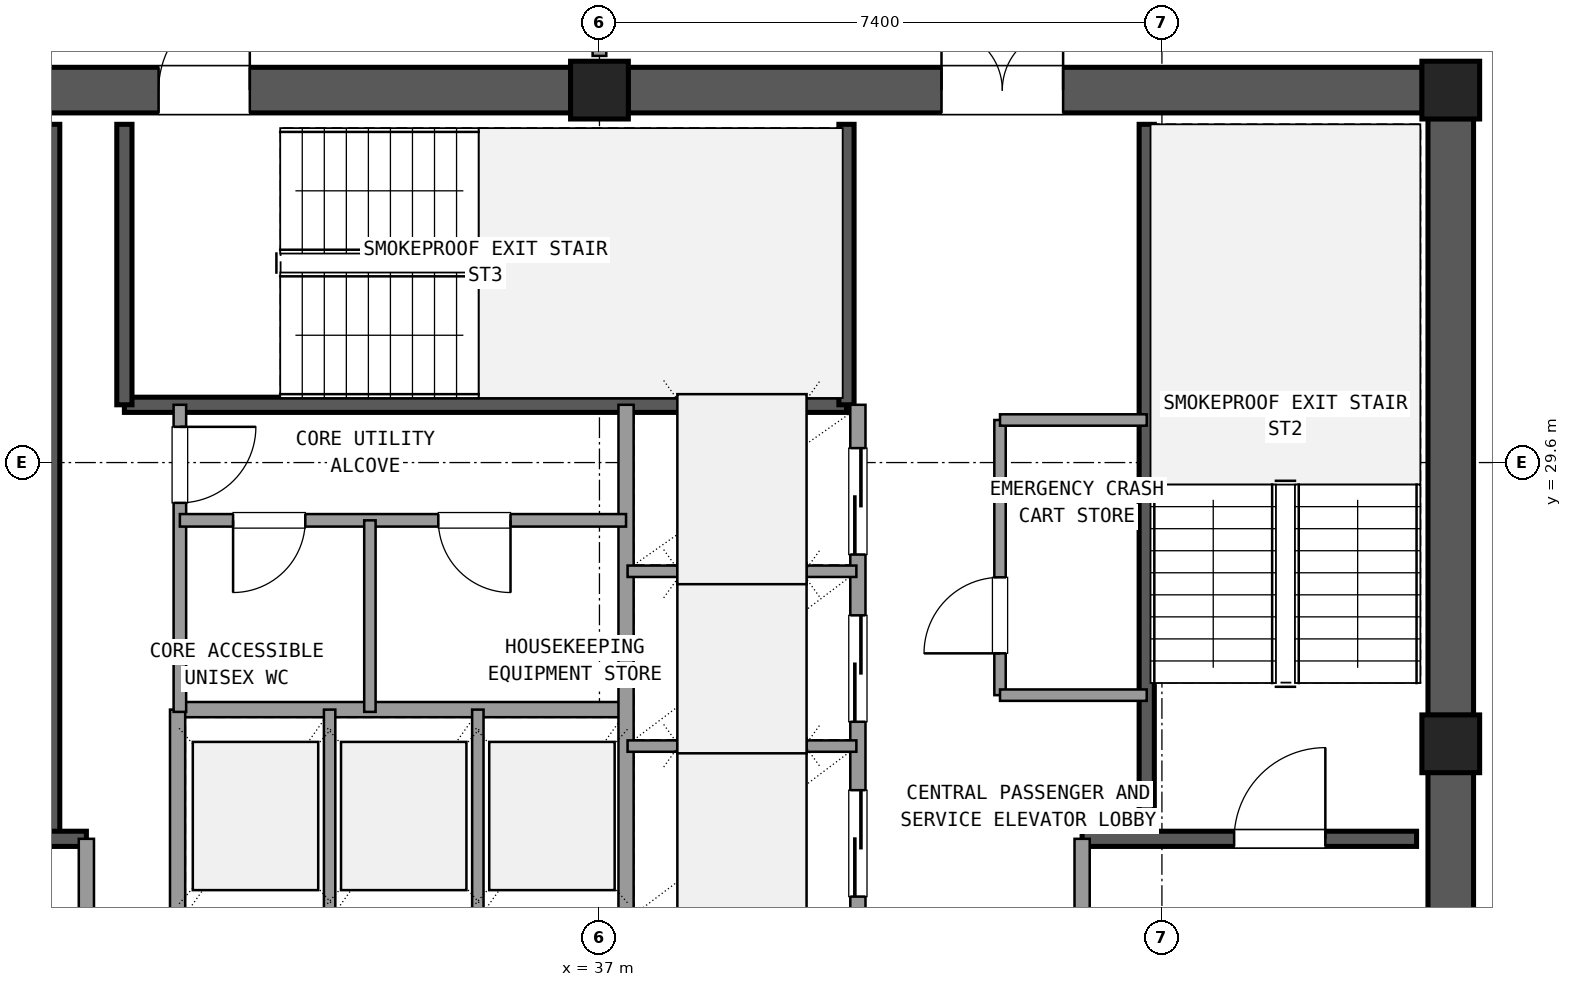
"""IFC4 building model, lengths in metres.
Left out: names, types, materials, properties, quantities, classifications, styles, units other than length and angle.
Written with IfcOpenShell. Run it as: python <this file> out.ifc"""

import sys

from ifc_helpers import new_model, si_unit, direction, frame, frame_2d, origin, origin_2d, place, context, subcontext, project, spatial, rectangle, extrude, element, fill, save


model = new_model("IFC4")
c1 = context("Model", 3, precision=1e-05, world=origin(), true_north=direction((0.0, 1.0)))
c2 = subcontext(c1, "Body", "Model", "MODEL_VIEW")
j1 = project(units=[si_unit("LENGTHUNIT", "METRE"), si_unit("PLANEANGLEUNIT", "RADIAN")], contexts=[c1])
p1 = place(None, origin())
s1 = spatial("IfcSite", under=j1, at=p1, CompositionType="ELEMENT")
p2 = place(p1, origin())
s2 = spatial("IfcBuilding", under=s1, at=p2, CompositionType="ELEMENT")
p3 = place(p2, frame((0.0, 0.0, 257.22)))
s3 = spatial("IfcBuildingStorey", under=s2, at=p3, CompositionType="ELEMENT", Elevation=257.22)
for number, where, z_axis, x_axis in (
    (1, (48.2, 25.9, 0.0), (0.0, 0.0, 1.0), (1.0, 0.0, 0.0)),
    (2, (48.2, 34.5, 0.0), (0.0, 0.0, 1.0), (1.0, 0.0, 0.0)),
    (3, (37.0, 34.5, 0.0), (0.0, 0.0, 1.0), (1.0, 0.0, 0.0)),
):
    element("IfcColumn", number, at=place(p3, frame(where, z_axis=z_axis, x_axis=x_axis)), inside=s3, PredefinedType="COLUMN", context=c2, shape_type="SweptSolid", body=[
        extrude(rectangle(XDim=0.76, YDim=0.76, at=origin_2d()), origin(), (0.0, 0.0, 1.0), 3.6),
    ])
p4 = place(p3, frame((48.2, 17.675, 0.0), z_axis=(0.0, 0.0, 1.0), x_axis=(0.0, 1.0, 0.0)))
e4 = element("IfcWall", 4, at=p4, inside=s3, PredefinedType="SHEAR", context=c2, shape_type="SweptSolid", body=[
    extrude(rectangle(XDim=7.85, YDim=0.6, at=frame_2d((3.925, 0.0))), origin(), (0.0, 0.0, 1.0), 3.32),
])
p5 = place(p4, frame((4.375, 0.0, 0.0)))
e5 = element("IfcOpeningElement", 5, at=p5, cuts=e4, PredefinedType="OPENING", context=c2, shape_type="SweptSolid", body=[
    extrude(rectangle(XDim=1.2, YDim=2.15, at=frame_2d((0.6, 1.075))), frame((0.0, 0.31, 0.0), z_axis=(0.0, -1.0, 0.0), x_axis=(1.0, 0.0, 0.0)), (0.0, 0.0, 1.0), 0.62),
])
p6 = place(p3, frame((48.2, 26.275, 0.0), z_axis=(0.0, 0.0, 1.0), x_axis=(0.0, 1.0, 0.0)))
e6 = element("IfcWall", 6, at=p6, inside=s3, PredefinedType="SHEAR", context=c2, shape_type="SweptSolid", body=[
    extrude(rectangle(XDim=7.85, YDim=0.6, at=frame_2d((3.925, 0.0))), origin(), (0.0, 0.0, 1.0), 3.32),
])
p7 = place(p3, frame((47.825, 34.5, 0.0), z_axis=(0.0, 0.0, 1.0), x_axis=(-1.0, 0.0, 0.0)))
e7 = element("IfcWall", 7, at=p7, inside=s3, PredefinedType="SHEAR", context=c2, shape_type="SweptSolid", body=[
    extrude(rectangle(XDim=10.45, YDim=0.6, at=frame_2d((5.225, 0.0))), origin(), (0.0, 0.0, 1.0), 3.32),
])
p8 = place(p7, frame((4.725, 0.0, 0.0)))
e8 = element("IfcOpeningElement", 8, at=p8, cuts=e7, PredefinedType="OPENING", context=c2, shape_type="SweptSolid", body=[
    extrude(rectangle(XDim=1.6, YDim=2.2, at=frame_2d((0.8, 1.1))), frame((0.0, 0.31, 0.0), z_axis=(0.0, -1.0, 0.0), x_axis=(1.0, 0.0, 0.0)), (0.0, 0.0, 1.0), 0.62),
])
p9 = place(p3, frame((36.625, 34.5, 0.0), z_axis=(0.0, 0.0, 1.0), x_axis=(-1.0, 0.0, 0.0)))
e9 = element("IfcWall", 9, at=p9, inside=s3, PredefinedType="SHEAR", context=c2, shape_type="SweptSolid", body=[
    extrude(rectangle(XDim=10.45, YDim=0.6, at=frame_2d((5.225, 0.0))), origin(), (0.0, 0.0, 1.0), 3.32),
])
p10 = place(p9, frame((4.225, 0.0, 0.0)))
e10 = element("IfcOpeningElement", 10, at=p10, cuts=e9, PredefinedType="OPENING", context=c2, shape_type="SweptSolid", body=[
    extrude(rectangle(XDim=1.2, YDim=2.15, at=frame_2d((0.6, 1.075))), frame((0.0, 0.31, 0.0), z_axis=(0.0, -1.0, 0.0), x_axis=(1.0, 0.0, 0.0)), (0.0, 0.0, 1.0), 0.62),
])
p11 = place(p3, frame((29.8, 24.65, 0.0), z_axis=(0.0, 0.0, 1.0), x_axis=(0.0, 1.0, 0.0)))
e11 = element("IfcWall", 11, at=p11, inside=s3, PredefinedType="SHEAR", context=c2, shape_type="SweptSolid", body=[
    extrude(rectangle(XDim=9.4, YDim=0.2, at=frame_2d((4.7, 0.0))), origin(), (0.0, 0.0, 1.0), 3.32),
])
p12 = place(p3, frame((26.25, 24.65, 0.0), z_axis=(0.0, 0.0, 1.0), x_axis=(1.0, 0.0, 0.0)))
e12 = element("IfcWall", 12, at=p12, inside=s3, PredefinedType="SHEAR", context=c2, shape_type="SweptSolid", body=[
    extrude(rectangle(XDim=4.0, YDim=0.2, at=frame_2d((2.0, 0.0))), origin(), (0.0, 0.0, 1.0), 3.32),
])
p13 = place(p12, frame((1.0, 0.0, 0.0)))
e13 = element("IfcOpeningElement", 13, at=p13, cuts=e12, PredefinedType="OPENING", context=c2, shape_type="SweptSolid", body=[
    extrude(rectangle(XDim=1.2, YDim=2.15, at=frame_2d((0.6, 1.075))), frame((0.0, 0.11, 0.0), z_axis=(0.0, -1.0, 0.0), x_axis=(1.0, 0.0, 0.0)), (0.0, 0.0, 1.0), 0.22),
])
p14 = place(p3, frame((44.2, 24.65, 0.0), z_axis=(0.0, 0.0, 1.0), x_axis=(0.0, 1.0, 0.0)))
e14 = element("IfcWall", 14, at=p14, inside=s3, PredefinedType="SHEAR", context=c2, shape_type="SweptSolid", body=[
    extrude(rectangle(XDim=9.4, YDim=0.2, at=frame_2d((4.7, 0.0))), origin(), (0.0, 0.0, 1.0), 3.32),
])
p15 = place(p3, frame((43.35, 24.65, 0.0), z_axis=(0.0, 0.0, 1.0), x_axis=(1.0, 0.0, 0.0)))
e15 = element("IfcWall", 15, at=p15, inside=s3, PredefinedType="SHEAR", context=c2, shape_type="SweptSolid", body=[
    extrude(rectangle(XDim=4.4, YDim=0.2, at=frame_2d((2.2, 0.0))), origin(), (0.0, 0.0, 1.0), 3.32),
])
p16 = place(p15, frame((2.0, 0.0, 0.0)))
e16 = element("IfcOpeningElement", 16, at=p16, cuts=e15, PredefinedType="OPENING", context=c2, shape_type="SweptSolid", body=[
    extrude(rectangle(XDim=1.2, YDim=2.15, at=frame_2d((0.6, 1.075))), frame((0.0, 0.11, 0.0), z_axis=(0.0, -1.0, 0.0), x_axis=(1.0, 0.0, 0.0)), (0.0, 0.0, 1.0), 0.22),
])
p17 = place(p3, frame((30.75, 30.36, 0.0), z_axis=(0.0, 0.0, 1.0), x_axis=(1.0, 0.0, 0.0)))
e17 = element("IfcWall", 17, at=p17, inside=s3, PredefinedType="SHEAR", context=c2, shape_type="SweptSolid", body=[
    extrude(rectangle(XDim=9.5, YDim=0.2, at=frame_2d((4.75, 0.0))), origin(), (0.0, 0.0, 1.0), 3.32),
])
for number, where, z_axis, x_axis in (
    (18, (30.75, 30.36, 0.0), (0.0, 0.0, 1.0), (0.0, 1.0, 0.0)),
    (19, (40.25, 30.36, 0.0), (0.0, 0.0, 1.0), (0.0, 1.0, 0.0)),
):
    element("IfcWall", number, at=place(p3, frame(where, z_axis=z_axis, x_axis=x_axis)), inside=s3, PredefinedType="SHEAR", context=c2, shape_type="SweptSolid", body=[
        extrude(rectangle(XDim=3.69, YDim=0.2, at=frame_2d((1.845, 0.0))), origin(), (0.0, 0.0, 1.0), 3.32),
    ])
p18 = place(p3, frame((30.25, 17.75, 0.0), z_axis=(0.0, 0.0, 1.0), x_axis=(0.0, 1.0, 0.0)))
e20 = element("IfcWall", 20, at=p18, inside=s3, PredefinedType="SOLIDWALL", context=c2, shape_type="SweptSolid", body=[
    extrude(rectangle(XDim=6.9, YDim=0.2, at=frame_2d((3.45, 0.0))), origin(), (0.0, 0.0, 1.0), 2.61),
])
p19 = place(p18, frame((4.15, 0.0, 0.0)))
e21 = element("IfcOpeningElement", 21, at=p19, cuts=e20, PredefinedType="OPENING", context=c2, shape_type="SweptSolid", body=[
    extrude(rectangle(XDim=1.2, YDim=2.15, at=frame_2d((0.6, 1.075))), frame((0.0, 0.11, 0.0), z_axis=(0.0, -1.0, 0.0), x_axis=(1.0, 0.0, 0.0)), (0.0, 0.0, 1.0), 0.22),
])
p20 = place(p3, frame((43.35, 17.75, 0.0), z_axis=(0.0, 0.0, 1.0), x_axis=(0.0, 1.0, 0.0)))
e22 = element("IfcWall", 22, at=p20, inside=s3, PredefinedType="SOLIDWALL", context=c2, shape_type="SweptSolid", body=[
    extrude(rectangle(XDim=6.9, YDim=0.2, at=frame_2d((3.45, 0.0))), origin(), (0.0, 0.0, 1.0), 2.61),
])
p21 = place(p20, frame((4.15, 0.0, 0.0)))
e23 = element("IfcOpeningElement", 23, at=p21, cuts=e22, PredefinedType="OPENING", context=c2, shape_type="SweptSolid", body=[
    extrude(rectangle(XDim=1.2, YDim=2.15, at=frame_2d((0.6, 1.075))), frame((0.0, 0.11, 0.0), z_axis=(0.0, -1.0, 0.0), x_axis=(1.0, 0.0, 0.0)), (0.0, 0.0, 1.0), 0.22),
])
p22 = place(p3, frame((31.45, 26.35, 0.0), z_axis=(0.0, 0.0, 1.0), x_axis=(1.0, 0.0, 0.0)))
e24 = element("IfcWall", 24, at=p22, inside=s3, PredefinedType="SOLIDWALL", context=c2, shape_type="SweptSolid", body=[
    extrude(rectangle(XDim=5.9, YDim=0.2, at=frame_2d((2.95, 0.0))), origin(), (0.0, 0.0, 1.0), 2.61),
])
p23 = place(p3, frame((31.45, 23.54, 0.0), z_axis=(0.0, 0.0, 1.0), x_axis=(0.0, 1.0, 0.0)))
e25 = element("IfcWall", 25, at=p23, inside=s3, PredefinedType="SOLIDWALL", context=c2, shape_type="SweptSolid", body=[
    extrude(rectangle(XDim=2.81, YDim=0.2, at=frame_2d((1.405, 0.0))), origin(), (0.0, 0.0, 1.0), 2.61),
])
for number, where, z_axis, x_axis in (
    (26, (33.45, 23.54, 0.0), (0.0, 0.0, 1.0), (0.0, 1.0, 0.0)),
    (27, (35.4, 23.54, 0.0), (0.0, 0.0, 1.0), (0.0, 1.0, 0.0)),
):
    element("IfcWall", number, at=place(p3, frame(where, z_axis=z_axis, x_axis=x_axis)), inside=s3, PredefinedType="PARTITIONING", context=c2, shape_type="SweptSolid", body=[
        extrude(rectangle(XDim=2.81, YDim=0.15, at=frame_2d((1.405, 0.0))), origin(), (0.0, 0.0, 1.0), 2.61),
    ])
p24 = place(p3, frame((37.35, 23.54, 0.0), z_axis=(0.0, 0.0, 1.0), x_axis=(0.0, 1.0, 0.0)))
e28 = element("IfcWall", 28, at=p24, inside=s3, PredefinedType="SOLIDWALL", context=c2, shape_type="SweptSolid", body=[
    extrude(rectangle(XDim=6.82, YDim=0.2, at=frame_2d((3.41, 0.0))), origin(), (0.0, 0.0, 1.0), 2.61),
])
p25 = place(p3, frame((40.4, 23.54, 0.0), z_axis=(0.0, 0.0, 1.0), x_axis=(0.0, 1.0, 0.0)))
e29 = element("IfcWall", 29, at=p25, inside=s3, PredefinedType="SOLIDWALL", context=c2, shape_type="SweptSolid", body=[
    extrude(rectangle(XDim=6.82, YDim=0.2, at=frame_2d((3.41, 0.0))), origin(), (0.0, 0.0, 1.0), 2.61),
])
p26 = place(p25, frame((0.35, 0.0, 0.0)))
e30 = element("IfcOpeningElement", 30, at=p26, cuts=e29, PredefinedType="OPENING", context=c2, shape_type="SweptSolid", body=[
    extrude(rectangle(XDim=1.4, YDim=2.2, at=frame_2d((0.7, 1.1))), frame((0.0, 0.11, 0.0), z_axis=(0.0, -1.0, 0.0), x_axis=(1.0, 0.0, 0.0)), (0.0, 0.0, 1.0), 0.22),
])
p27 = place(p25, frame((2.65, 0.0, 0.0)))
e31 = element("IfcOpeningElement", 31, at=p27, cuts=e29, PredefinedType="OPENING", context=c2, shape_type="SweptSolid", body=[
    extrude(rectangle(XDim=1.4, YDim=2.2, at=frame_2d((0.7, 1.1))), frame((0.0, 0.11, 0.0), z_axis=(0.0, -1.0, 0.0), x_axis=(1.0, 0.0, 0.0)), (0.0, 0.0, 1.0), 0.22),
])
p28 = place(p25, frame((4.85, 0.0, 0.0)))
e32 = element("IfcOpeningElement", 32, at=p28, cuts=e29, PredefinedType="OPENING", context=c2, shape_type="SweptSolid", body=[
    extrude(rectangle(XDim=1.4, YDim=2.2, at=frame_2d((0.7, 1.1))), frame((0.0, 0.11, 0.0), z_axis=(0.0, -1.0, 0.0), x_axis=(1.0, 0.0, 0.0)), (0.0, 0.0, 1.0), 0.22),
])
for number, where, z_axis, x_axis in (
    (33, (37.37, 25.87, 0.0), (0.0, 0.0, 1.0), (1.0, 0.0, 0.0)),
    (34, (37.37, 28.17, 0.0), (0.0, 0.0, 1.0), (1.0, 0.0, 0.0)),
):
    element("IfcWall", number, at=place(p3, frame(where, z_axis=z_axis, x_axis=x_axis)), inside=s3, PredefinedType="PARTITIONING", context=c2, shape_type="SweptSolid", body=[
        extrude(rectangle(XDim=3.01, YDim=0.15, at=frame_2d((1.505, 0.0))), origin(), (0.0, 0.0, 1.0), 2.61),
    ])
p29 = place(p3, frame((42.27, 26.54, 0.0), z_axis=(0.0, 0.0, 1.0), x_axis=(0.0, 1.0, 0.0)))
e35 = element("IfcWall", 35, at=p29, inside=s3, PredefinedType="PARTITIONING", context=c2, shape_type="SweptSolid", body=[
    extrude(rectangle(XDim=3.62, YDim=0.15, at=frame_2d((1.81, 0.0))), origin(), (0.0, 0.0, 1.0), 2.61),
])
p30 = place(p29, frame((0.55, 0.0, 0.0)))
e36 = element("IfcOpeningElement", 36, at=p30, cuts=e35, PredefinedType="OPENING", context=c2, shape_type="SweptSolid", body=[
    extrude(rectangle(XDim=1.0, YDim=2.15, at=frame_2d((0.5, 1.075))), frame((0.0, 0.085, 0.0), z_axis=(0.0, -1.0, 0.0), x_axis=(1.0, 0.0, 0.0)), (0.0, 0.0, 1.0), 0.17),
])
for number, where, z_axis, x_axis in (
    (37, (42.27, 26.54, 0.0), (0.0, 0.0, 1.0), (1.0, 0.0, 0.0)),
    (38, (42.27, 30.16, 0.0), (0.0, 0.0, 1.0), (1.0, 0.0, 0.0)),
):
    element("IfcWall", number, at=place(p3, frame(where, z_axis=z_axis, x_axis=x_axis)), inside=s3, PredefinedType="PARTITIONING", context=c2, shape_type="SweptSolid", body=[
        extrude(rectangle(XDim=1.93, YDim=0.15, at=frame_2d((0.965, 0.0))), origin(), (0.0, 0.0, 1.0), 2.61),
    ])
p31 = place(p3, frame((31.48, 26.32, 0.0), z_axis=(0.0, 0.0, 1.0), x_axis=(0.0, 1.0, 0.0)))
e39 = element("IfcWall", 39, at=p31, inside=s3, PredefinedType="PLUMBINGWALL", context=c2, shape_type="SweptSolid", body=[
    extrude(rectangle(XDim=4.04, YDim=0.165, at=frame_2d((2.02, 0.0))), origin(), (0.0, 0.0, 1.0), 2.61),
])
p32 = place(p31, frame((2.75, 0.0, 0.0)))
e40 = element("IfcOpeningElement", 40, at=p32, cuts=e39, PredefinedType="OPENING", context=c2, shape_type="SweptSolid", body=[
    extrude(rectangle(XDim=1.0, YDim=2.15, at=frame_2d((0.5, 1.075))), frame((0.0, 0.093, 0.0), z_axis=(0.0, -1.0, 0.0), x_axis=(1.0, 0.0, 0.0)), (0.0, 0.0, 1.0), 0.185),
])
p33 = place(p3, frame((31.48, 28.84, 0.0), z_axis=(0.0, 0.0, 1.0), x_axis=(1.0, 0.0, 0.0)))
e41 = element("IfcWall", 41, at=p33, inside=s3, PredefinedType="PLUMBINGWALL", context=c2, shape_type="SweptSolid", body=[
    extrude(rectangle(XDim=5.87, YDim=0.165, at=frame_2d((2.935, 0.0))), origin(), (0.0, 0.0, 1.0), 2.61),
])
p34 = place(p33, frame((0.7, 0.0, 0.0)))
e42 = element("IfcOpeningElement", 42, at=p34, cuts=e41, PredefinedType="OPENING", context=c2, shape_type="SweptSolid", body=[
    extrude(rectangle(XDim=0.95, YDim=2.1, at=frame_2d((0.475, 1.05))), frame((0.0, 0.093, 0.0), z_axis=(0.0, -1.0, 0.0), x_axis=(1.0, 0.0, 0.0)), (0.0, 0.0, 1.0), 0.185),
])
p35 = place(p33, frame((3.4, 0.0, 0.0)))
e43 = element("IfcOpeningElement", 43, at=p35, cuts=e41, PredefinedType="OPENING", context=c2, shape_type="SweptSolid", body=[
    extrude(rectangle(XDim=0.95, YDim=2.1, at=frame_2d((0.475, 1.05))), frame((0.0, 0.093, 0.0), z_axis=(0.0, -1.0, 0.0), x_axis=(1.0, 0.0, 0.0)), (0.0, 0.0, 1.0), 0.185),
])
p36 = place(p3, frame((33.98, 26.32, 0.0), z_axis=(0.0, 0.0, 1.0), x_axis=(0.0, 1.0, 0.0)))
e44 = element("IfcWall", 44, at=p36, inside=s3, PredefinedType="PARTITIONING", context=c2, shape_type="SweptSolid", body=[
    extrude(rectangle(XDim=2.52, YDim=0.15, at=frame_2d((1.26, 0.0))), origin(), (0.0, 0.0, 1.0), 2.61),
])
p37 = place(p3, frame((37.0, 34.95, 0.0), z_axis=(0.0, 0.0, 1.0), x_axis=(0.0, 1.0, 0.0)))
e45 = element("IfcWall", 45, at=p37, inside=s3, PredefinedType="PARTITIONING", context=c2, shape_type="SweptSolid", body=[
    extrude(rectangle(XDim=2.7, YDim=0.18, at=frame_2d((1.35, 0.0))), origin(), (0.0, 0.0, 1.0), 2.61),
])
p38 = place(p37, frame((0.35, 0.0, 0.0)))
e46 = element("IfcOpeningElement", 46, at=p38, cuts=e45, PredefinedType="OPENING", context=c2, shape_type="SweptSolid", body=[
    extrude(rectangle(XDim=2.0, YDim=2.2, at=frame_2d((1.0, 1.1))), frame((0.0, 0.1, 0.0), z_axis=(0.0, -1.0, 0.0), x_axis=(1.0, 0.0, 0.0)), (0.0, 0.0, 1.0), 0.2),
])
p39 = place(p16, origin())
e47 = element("IfcDoor", 47, at=p39, inside=s3, OperationType="SINGLE_SWING_RIGHT", PredefinedType="DOOR", context=c2, shape_type="SweptSolid", body=[
    extrude(rectangle(XDim=1.2, YDim=2.15, at=frame_2d((0.6, 1.075))), frame((0.0, 0.025, 0.0), z_axis=(0.0, -1.0, 0.0), x_axis=(1.0, 0.0, 0.0)), (0.0, 0.0, 1.0), 0.05),
])
fill(e16, e47)
p40 = place(p8, frame((1.6, 0.0, 0.0), z_axis=(0.0, 0.0, 1.0), x_axis=(-1.0, 0.0, 0.0)))
e48 = element("IfcDoor", 48, at=p40, inside=s3, OperationType="DOUBLE_DOOR_SINGLE_SWING", PredefinedType="DOOR", context=c2, shape_type="SweptSolid", body=[
    extrude(rectangle(XDim=1.6, YDim=2.2, at=frame_2d((0.8, 1.1))), frame((0.0, 0.025, 0.0), z_axis=(0.0, -1.0, 0.0), x_axis=(1.0, 0.0, 0.0)), (0.0, 0.0, 1.0), 0.05),
])
fill(e8, e48)
p41 = place(p10, frame((1.2, 0.0, 0.0), z_axis=(0.0, 0.0, 1.0), x_axis=(-1.0, 0.0, 0.0)))
e49 = element("IfcDoor", 49, at=p41, inside=s3, OperationType="SINGLE_SWING_LEFT", PredefinedType="DOOR", context=c2, shape_type="SweptSolid", body=[
    extrude(rectangle(XDim=1.2, YDim=2.15, at=frame_2d((0.6, 1.075))), frame((0.0, 0.025, 0.0), z_axis=(0.0, -1.0, 0.0), x_axis=(1.0, 0.0, 0.0)), (0.0, 0.0, 1.0), 0.05),
])
fill(e10, e49)
p42 = place(p26, origin())
e50 = element("IfcDoor", 50, at=p42, inside=s3, OperationType="SLIDING_TO_LEFT", PredefinedType="DOOR", context=c2, shape_type="SweptSolid", body=[
    extrude(rectangle(XDim=1.4, YDim=2.2, at=frame_2d((0.7, 1.1))), frame((0.0, 0.025, 0.0), z_axis=(0.0, -1.0, 0.0), x_axis=(1.0, 0.0, 0.0)), (0.0, 0.0, 1.0), 0.05),
])
fill(e30, e50)
p43 = place(p27, origin())
e51 = element("IfcDoor", 51, at=p43, inside=s3, OperationType="SLIDING_TO_LEFT", PredefinedType="DOOR", context=c2, shape_type="SweptSolid", body=[
    extrude(rectangle(XDim=1.4, YDim=2.2, at=frame_2d((0.7, 1.1))), frame((0.0, 0.025, 0.0), z_axis=(0.0, -1.0, 0.0), x_axis=(1.0, 0.0, 0.0)), (0.0, 0.0, 1.0), 0.05),
])
fill(e31, e51)
p44 = place(p28, origin())
e52 = element("IfcDoor", 52, at=p44, inside=s3, OperationType="SLIDING_TO_RIGHT", PredefinedType="DOOR", context=c2, shape_type="SweptSolid", body=[
    extrude(rectangle(XDim=1.4, YDim=2.2, at=frame_2d((0.7, 1.1))), frame((0.0, 0.025, 0.0), z_axis=(0.0, -1.0, 0.0), x_axis=(1.0, 0.0, 0.0)), (0.0, 0.0, 1.0), 0.05),
])
fill(e32, e52)
p45 = place(p30, origin())
e53 = element("IfcDoor", 53, at=p45, inside=s3, OperationType="SINGLE_SWING_LEFT", PredefinedType="DOOR", context=c2, shape_type="SweptSolid", body=[
    extrude(rectangle(XDim=1.0, YDim=2.15, at=frame_2d((0.5, 1.075))), frame((0.0, 0.025, 0.0), z_axis=(0.0, -1.0, 0.0), x_axis=(1.0, 0.0, 0.0)), (0.0, 0.0, 1.0), 0.05),
])
fill(e36, e53)
p46 = place(p32, frame((1.0, 0.0, 0.0), z_axis=(0.0, 0.0, 1.0), x_axis=(-1.0, 0.0, 0.0)))
e54 = element("IfcDoor", 54, at=p46, inside=s3, OperationType="SINGLE_SWING_RIGHT", PredefinedType="DOOR", context=c2, shape_type="SweptSolid", body=[
    extrude(rectangle(XDim=1.0, YDim=2.15, at=frame_2d((0.5, 1.075))), frame((0.0, 0.025, 0.0), z_axis=(0.0, -1.0, 0.0), x_axis=(1.0, 0.0, 0.0)), (0.0, 0.0, 1.0), 0.05),
])
fill(e40, e54)
p47 = place(p34, frame((0.95, 0.0, 0.0), z_axis=(0.0, 0.0, 1.0), x_axis=(-1.0, 0.0, 0.0)))
e55 = element("IfcDoor", 55, at=p47, inside=s3, OperationType="SINGLE_SWING_LEFT", PredefinedType="DOOR", context=c2, shape_type="SweptSolid", body=[
    extrude(rectangle(XDim=0.95, YDim=2.1, at=frame_2d((0.475, 1.05))), frame((0.0, 0.025, 0.0), z_axis=(0.0, -1.0, 0.0), x_axis=(1.0, 0.0, 0.0)), (0.0, 0.0, 1.0), 0.05),
])
fill(e42, e55)
p48 = place(p35, frame((0.95, 0.0, 0.0), z_axis=(0.0, 0.0, 1.0), x_axis=(-1.0, 0.0, 0.0)))
e56 = element("IfcDoor", 56, at=p48, inside=s3, OperationType="SINGLE_SWING_RIGHT", PredefinedType="DOOR", context=c2, shape_type="SweptSolid", body=[
    extrude(rectangle(XDim=0.95, YDim=2.1, at=frame_2d((0.475, 1.05))), frame((0.0, 0.025, 0.0), z_axis=(0.0, -1.0, 0.0), x_axis=(1.0, 0.0, 0.0)), (0.0, 0.0, 1.0), 0.05),
])
fill(e43, e56)
save(model, sys.argv[1])
